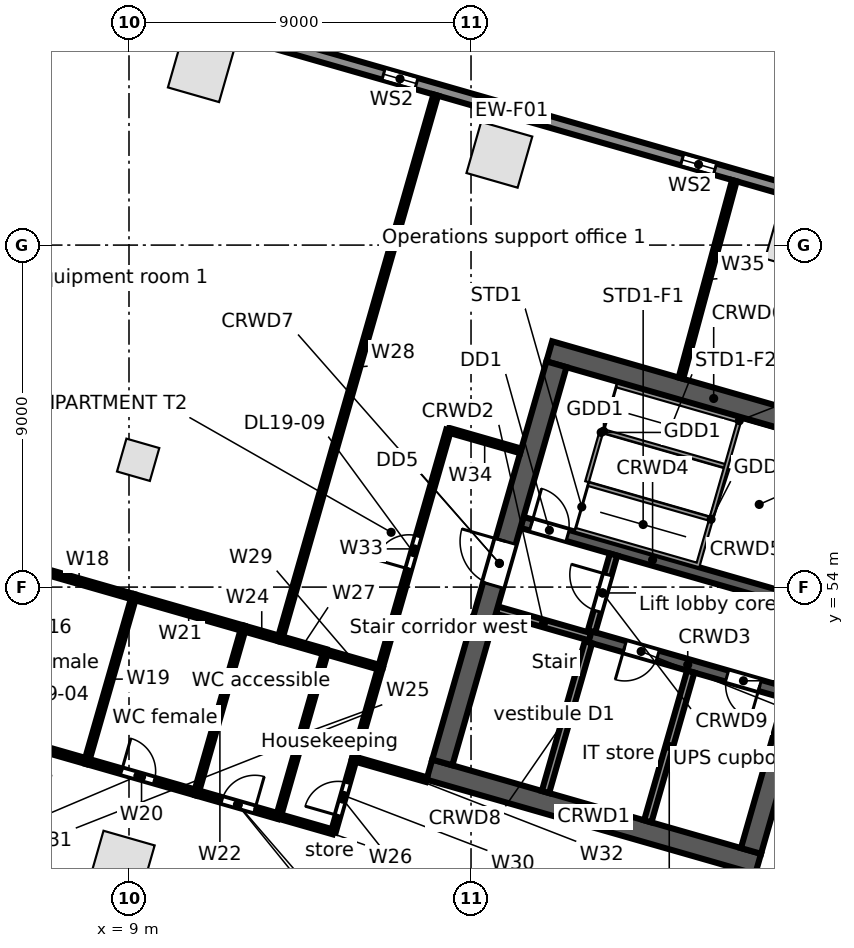
"""IFC4 building model, lengths in metres.
Left out: names, types, materials, properties, quantities, classifications, styles, units other than length and angle.
Written with IfcOpenShell. Run it as: python <this file> out.ifc"""

import sys

from ifc_helpers import new_model, si_unit, direction, frame, frame_2d, origin, origin_2d, place, context, subcontext, project, spatial, rectangle, extrude, element, fill, save


model = new_model("IFC4")
c1 = context("Model", 3, precision=1e-05, world=origin(), true_north=direction((0.0, 1.0)))
c2 = subcontext(c1, "Body", "Model", "MODEL_VIEW")
j1 = project(units=[si_unit("LENGTHUNIT", "METRE"), si_unit("PLANEANGLEUNIT", "RADIAN")], contexts=[c1])
p1 = place(None, origin())
s1 = spatial("IfcSite", under=j1, at=p1, CompositionType="ELEMENT")
p2 = place(p1, origin())
s2 = spatial("IfcBuilding", under=s1, at=p2, CompositionType="ELEMENT")
p3 = place(p2, frame((0.0, 0.0, 97.1)))
s3 = spatial("IfcBuildingStorey", under=s2, at=p3, CompositionType="ELEMENT", Elevation=97.1)
for number, where, z_axis, x_axis in (
    (1, (26.603, 63.124, 0.0), (0.0, 0.0, 1.0), (-0.961, 0.276, 0.0)),
    (2, (18.746, 65.376, 0.0), (0.0, 0.0, 1.0), (-0.961, 0.276, 0.0)),
    (3, (10.89, 67.629, 0.0), (0.0, 0.0, 1.0), (-0.961, 0.276, 0.0)),
    (4, (8.81, 46.722, 0.0), (0.0, 0.0, 1.0), (0.961, -0.276, 0.0)),
):
    element("IfcColumn", number, at=place(p3, frame(where, z_axis=z_axis, x_axis=x_axis)), inside=s3, PredefinedType="COLUMN", context=c2, shape_type="SweptSolid", body=[
        extrude(rectangle(XDim=1.4, YDim=1.4, at=origin_2d()), origin(), (0.0, 0.0, 1.0), 4.4),
    ])
p4 = place(p3, frame((9.241, 57.35, 0.0), z_axis=(0.0, 0.0, 1.0), x_axis=(0.961261695938, -0.275637355817, 0.0)))
e5 = element("IfcColumn", 5, at=p4, inside=s3, PredefinedType="COLUMN", context=c2, shape_type="SweptSolid", body=[
    extrude(rectangle(XDim=0.9, YDim=0.9, at=origin_2d()), origin(), (0.0, 0.0, 1.0), 4.4),
])
p5 = place(p3, frame((3.335, 71.044, 0.0), z_axis=(0.0, 0.0, 1.0), x_axis=(0.961260130989, -0.275642813387, 0.0)))
e6 = element("IfcWall", 6, at=p5, inside=s3, PredefinedType="STANDARD", context=c2, shape_type="SweptSolid", body=[
    extrude(rectangle(XDim=32.741, YDim=0.3, at=frame_2d((16.371, 0.0))), origin(), (0.0, 0.0, 1.0), 4.08),
])
p6 = place(p5, frame((29.207, 0.0, 0.6)))
e7 = element("IfcOpeningElement", 7, at=p6, cuts=e6, PredefinedType="OPENING", context=c2, shape_type="SweptSolid", body=[
    extrude(rectangle(XDim=0.9, YDim=2.8, at=frame_2d((0.45, 1.4))), frame((0.0, 0.16, 0.0), z_axis=(0.0, -1.0, 0.0), x_axis=(1.0, 0.0, 0.0)), (0.0, 0.0, 1.0), 0.32),
])
p7 = place(p5, frame((21.034, 0.0, 0.6)))
e8 = element("IfcOpeningElement", 8, at=p7, cuts=e6, PredefinedType="OPENING", context=c2, shape_type="SweptSolid", body=[
    extrude(rectangle(XDim=0.9, YDim=2.8, at=frame_2d((0.45, 1.4))), frame((0.0, 0.16, 0.0), z_axis=(0.0, -1.0, 0.0), x_axis=(1.0, 0.0, 0.0)), (0.0, 0.0, 1.0), 0.32),
])
p8 = place(p5, frame((12.861, 0.0, 0.6)))
e9 = element("IfcOpeningElement", 9, at=p8, cuts=e6, PredefinedType="OPENING", context=c2, shape_type="SweptSolid", body=[
    extrude(rectangle(XDim=0.9, YDim=2.8, at=frame_2d((0.45, 1.4))), frame((0.0, 0.16, 0.0), z_axis=(0.0, -1.0, 0.0), x_axis=(1.0, 0.0, 0.0)), (0.0, 0.0, 1.0), 0.32),
])
p9 = place(p5, frame((4.688, 0.0, 0.6)))
e10 = element("IfcOpeningElement", 10, at=p9, cuts=e6, PredefinedType="OPENING", context=c2, shape_type="SweptSolid", body=[
    extrude(rectangle(XDim=0.9, YDim=2.8, at=frame_2d((0.45, 1.4))), frame((0.0, 0.16, 0.0), z_axis=(0.0, -1.0, 0.0), x_axis=(1.0, 0.0, 0.0)), (0.0, 0.0, 1.0), 0.32),
])
p10 = place(p3, frame((25.398, 40.717, 0.0), z_axis=(0.0, 0.0, 1.0), x_axis=(-0.961262423262, 0.275634819324, 0.0)))
e11 = element("IfcWall", 11, at=p10, inside=s3, PredefinedType="STANDARD", context=c2, shape_type="SweptSolid", body=[
    extrude(rectangle(XDim=26.359, YDim=0.3, at=frame_2d((13.179, 0.0))), origin(), (0.0, 0.0, 1.0), 4.08),
])
p11 = place(p10, frame((22.664, 0.0, 0.6)))
e12 = element("IfcOpeningElement", 12, at=p11, cuts=e11, PredefinedType="OPENING", context=c2, shape_type="SweptSolid", body=[
    extrude(rectangle(XDim=0.9, YDim=2.8, at=frame_2d((0.45, 1.4))), frame((0.0, 0.16, 0.0), z_axis=(0.0, -1.0, 0.0), x_axis=(1.0, 0.0, 0.0)), (0.0, 0.0, 1.0), 0.32),
])
p12 = place(p10, frame((13.844, 0.0, 0.6)))
e13 = element("IfcOpeningElement", 13, at=p12, cuts=e11, PredefinedType="OPENING", context=c2, shape_type="SweptSolid", body=[
    extrude(rectangle(XDim=0.9, YDim=2.8, at=frame_2d((0.45, 1.4))), frame((0.0, 0.16, 0.0), z_axis=(0.0, -1.0, 0.0), x_axis=(1.0, 0.0, 0.0)), (0.0, 0.0, 1.0), 0.32),
])
p13 = place(p10, frame((5.023, 0.0, 0.6)))
e14 = element("IfcOpeningElement", 14, at=p13, cuts=e11, PredefinedType="OPENING", context=c2, shape_type="SweptSolid", body=[
    extrude(rectangle(XDim=0.9, YDim=2.8, at=frame_2d((0.45, 1.4))), frame((0.0, 0.16, 0.0), z_axis=(0.0, -1.0, 0.0), x_axis=(1.0, 0.0, 0.0)), (0.0, 0.0, 1.0), 0.32),
])
p14 = place(p3, frame((16.904, 49.197, 0.0), z_axis=(0.0, 0.0, 1.0), x_axis=(0.96126248289, -0.275634611374, 0.0)))
e15 = element("IfcWall", 15, at=p14, inside=s3, PredefinedType="SOLIDWALL", context=c2, shape_type="SweptSolid", body=[
    extrude(rectangle(XDim=9.0, YDim=0.55, at=frame_2d((4.5, 0.0))), origin(), (0.0, 0.0, 1.0), 4.08),
])
p15 = place(p3, frame((18.68, 53.396, 0.0), z_axis=(0.0, 0.0, 1.0), x_axis=(0.961234387647, -0.275732573349, 0.0)))
e16 = element("IfcWall", 16, at=p15, inside=s3, PredefinedType="SOLIDWALL", context=c2, shape_type="SweptSolid", body=[
    extrude(rectangle(XDim=2.55, YDim=0.2, at=frame_2d((1.275, 0.0))), origin(), (0.0, 0.0, 1.0), 4.08),
])
p16 = place(p3, frame((21.131, 52.692, 0.0), z_axis=(0.0, 0.0, 1.0), x_axis=(0.961265220997, -0.27562506218, 0.0)))
e17 = element("IfcWall", 17, at=p16, inside=s3, PredefinedType="SOLIDWALL", context=c2, shape_type="SweptSolid", body=[
    extrude(rectangle(XDim=5.35, YDim=0.3, at=frame_2d((2.675, 0.0))), origin(), (0.0, 0.0, 1.0), 4.08),
])
p17 = place(p16, frame((0.95, 0.0, 0.0)))
e18 = element("IfcOpeningElement", 18, at=p17, cuts=e17, PredefinedType="OPENING", context=c2, shape_type="SweptSolid", body=[
    extrude(rectangle(XDim=0.9, YDim=2.1, at=frame_2d((0.45, 1.05))), frame((0.0, 0.16, 0.0), z_axis=(0.0, -1.0, 0.0), x_axis=(1.0, 0.0, 0.0)), (0.0, 0.0, 1.0), 0.32),
])
p18 = place(p16, frame((3.75, 0.0, 0.0)))
e19 = element("IfcOpeningElement", 19, at=p18, cuts=e17, PredefinedType="OPENING", context=c2, shape_type="SweptSolid", body=[
    extrude(rectangle(XDim=0.9, YDim=2.1, at=frame_2d((0.45, 1.05))), frame((0.0, 0.16, 0.0), z_axis=(0.0, -1.0, 0.0), x_axis=(1.0, 0.0, 0.0)), (0.0, 0.0, 1.0), 0.32),
])
p19 = place(p3, frame((19.341, 55.702, 0.0), z_axis=(0.0, 0.0, 1.0), x_axis=(0.961263228157, -0.27563201228, 0.0)))
e20 = element("IfcWall", 20, at=p19, inside=s3, PredefinedType="SOLIDWALL", context=c2, shape_type="SweptSolid", body=[
    extrude(rectangle(XDim=7.15, YDim=0.3, at=frame_2d((3.575, 0.0))), origin(), (0.0, 0.0, 1.0), 4.08),
])
p20 = place(p19, frame((0.25, 0.0, 0.0)))
e21 = element("IfcOpeningElement", 21, at=p20, cuts=e20, PredefinedType="OPENING", context=c2, shape_type="SweptSolid", body=[
    extrude(rectangle(XDim=1.0, YDim=2.1, at=frame_2d((0.5, 1.05))), frame((0.0, 0.16, 0.0), z_axis=(0.0, -1.0, 0.0), x_axis=(1.0, 0.0, 0.0)), (0.0, 0.0, 1.0), 0.32),
])
p21 = place(p3, frame((20.06, 60.204, 0.0), z_axis=(0.0, 0.0, 1.0), x_axis=(0.96126248289, -0.275634611374, 0.0)))
e22 = element("IfcWall", 22, at=p21, inside=s3, PredefinedType="SOLIDWALL", context=c2, shape_type="SweptSolid", body=[
    extrude(rectangle(XDim=9.0, YDim=0.55, at=frame_2d((4.5, 0.0))), origin(), (0.0, 0.0, 1.0), 4.08),
])
p22 = place(p3, frame((17.244, 49.386, 0.0), z_axis=(0.0, 0.0, 1.0), x_axis=(0.275632146085, 0.96126318979, 0.0)))
e23 = element("IfcWall", 23, at=p22, inside=s3, PredefinedType="SOLIDWALL", context=c2, shape_type="SweptSolid", body=[
    extrude(rectangle(XDim=10.9, YDim=0.55, at=frame_2d((5.45, 0.0))), origin(), (0.0, 0.0, 1.0), 4.08),
])
p23 = place(p22, frame((4.85, 0.0, 0.0)))
e24 = element("IfcOpeningElement", 24, at=p23, cuts=e23, PredefinedType="OPENING", context=c2, shape_type="SweptSolid", body=[
    extrude(rectangle(XDim=1.2, YDim=2.1, at=frame_2d((0.6, 1.05))), frame((0.0, 0.285, 0.0), z_axis=(0.0, -1.0, 0.0), x_axis=(1.0, 0.0, 0.0)), (0.0, 0.0, 1.0), 0.57),
])
p24 = place(p3, frame((19.959, 48.607, 0.0), z_axis=(0.0, 0.0, 1.0), x_axis=(0.275641165445, 0.961260603537, 0.0)))
e25 = element("IfcWall", 25, at=p24, inside=s3, PredefinedType="SOLIDWALL", context=c2, shape_type="SweptSolid", body=[
    extrude(rectangle(XDim=4.1, YDim=0.2, at=frame_2d((2.05, 0.0))), origin(), (0.0, 0.0, 1.0), 4.08),
])
p25 = place(p3, frame((21.172, 52.837, 0.0), z_axis=(0.0, 0.0, 1.0), x_axis=(0.275657676022, 0.961255868981, 0.0)))
e26 = element("IfcWall", 26, at=p25, inside=s3, PredefinedType="PARTITIONING", context=c2, shape_type="SweptSolid", body=[
    extrude(rectangle(XDim=2.1, YDim=0.2, at=frame_2d((1.05, 0.0))), origin(), (0.0, 0.0, 1.0), 4.08),
])
p26 = place(p25, frame((0.55, 0.0, 0.0)))
e27 = element("IfcOpeningElement", 27, at=p26, cuts=e26, PredefinedType="OPENING", context=c2, shape_type="SweptSolid", body=[
    extrude(rectangle(XDim=1.0, YDim=2.1, at=frame_2d((0.5, 1.05))), frame((0.0, 0.11, 0.0), z_axis=(0.0, -1.0, 0.0), x_axis=(1.0, 0.0, 0.0)), (0.0, 0.0, 1.0), 0.22),
])
p27 = place(p3, frame((22.651, 47.835, 0.0), z_axis=(0.0, 0.0, 1.0), x_axis=(0.275625388668, 0.961265127383, 0.0)))
e28 = element("IfcWall", 28, at=p27, inside=s3, PredefinedType="PARTITIONING", context=c2, shape_type="SweptSolid", body=[
    extrude(rectangle(XDim=4.1, YDim=0.2, at=frame_2d((2.05, 0.0))), origin(), (0.0, 0.0, 1.0), 4.08),
])
p28 = place(p3, frame((25.366, 47.057, 0.0), z_axis=(0.0, 0.0, 1.0), x_axis=(0.275632146085, 0.96126318979, 0.0)))
e29 = element("IfcWall", 29, at=p28, inside=s3, PredefinedType="SOLIDWALL", context=c2, shape_type="SweptSolid", body=[
    extrude(rectangle(XDim=10.9, YDim=0.55, at=frame_2d((5.45, 0.0))), origin(), (0.0, 0.0, 1.0), 4.08),
])
p29 = place(p28, frame((4.85, 0.0, 0.0)))
e30 = element("IfcOpeningElement", 30, at=p29, cuts=e29, PredefinedType="OPENING", context=c2, shape_type="SweptSolid", body=[
    extrude(rectangle(XDim=1.2, YDim=2.1, at=frame_2d((0.6, 1.05))), frame((0.0, 0.285, 0.0), z_axis=(0.0, -1.0, 0.0), x_axis=(1.0, 0.0, 0.0)), (0.0, 0.0, 1.0), 0.57),
])
p30 = place(p3, frame((5.004, 50.243, 0.0), z_axis=(0.0, 0.0, 1.0), x_axis=(0.961268664977, -0.27561305073, 0.0)))
e31 = element("IfcWall", 31, at=p30, inside=s3, PredefinedType="PARTITIONING", context=c2, shape_type="SweptSolid", body=[
    extrude(rectangle(XDim=3.0, YDim=0.15, at=frame_2d((1.5, 0.0))), origin(), (0.0, 0.0, 1.0), 4.08),
])
p31 = place(p30, frame((0.95, 0.0, 0.0)))
e32 = element("IfcOpeningElement", 32, at=p31, cuts=e31, PredefinedType="OPENING", context=c2, shape_type="SweptSolid", body=[
    extrude(rectangle(XDim=0.9, YDim=2.1, at=frame_2d((0.45, 1.05))), frame((0.0, 0.085, 0.0), z_axis=(0.0, -1.0, 0.0), x_axis=(1.0, 0.0, 0.0)), (0.0, 0.0, 1.0), 0.17),
])
p32 = place(p3, frame((6.245, 54.568, 0.0), z_axis=(0.0, 0.0, 1.0), x_axis=(0.961240918172, -0.275709806194, 0.0)))
e33 = element("IfcWall", 33, at=p32, inside=s3, PredefinedType="PARTITIONING", context=c2, shape_type="SweptSolid", body=[
    extrude(rectangle(XDim=3.0, YDim=0.15, at=frame_2d((1.5, 0.0))), origin(), (0.0, 0.0, 1.0), 3.16),
])
p33 = place(p3, frame((7.888, 49.416, 0.0), z_axis=(0.0, 0.0, 1.0), x_axis=(0.275803080638, 0.96121415965, 0.0)))
e34 = element("IfcWall", 34, at=p33, inside=s3, PredefinedType="PARTITIONING", context=c2, shape_type="SweptSolid", body=[
    extrude(rectangle(XDim=4.5, YDim=0.125, at=frame_2d((2.25, 0.0))), origin(), (0.0, 0.0, 1.0), 3.16),
])
p34 = place(p3, frame((7.888, 49.416, 0.0), z_axis=(0.0, 0.0, 1.0), x_axis=(0.961268664977, -0.27561305073, 0.0)))
e35 = element("IfcWall", 35, at=p34, inside=s3, PredefinedType="PARTITIONING", context=c2, shape_type="SweptSolid", body=[
    extrude(rectangle(XDim=3.0, YDim=0.15, at=frame_2d((1.5, 0.0))), origin(), (0.0, 0.0, 1.0), 3.142),
])
p35 = place(p34, frame((0.95, 0.0, 0.0)))
e36 = element("IfcOpeningElement", 36, at=p35, cuts=e35, PredefinedType="OPENING", context=c2, shape_type="SweptSolid", body=[
    extrude(rectangle(XDim=0.9, YDim=2.1, at=frame_2d((0.45, 1.05))), frame((0.0, 0.085, 0.0), z_axis=(0.0, -1.0, 0.0), x_axis=(1.0, 0.0, 0.0)), (0.0, 0.0, 1.0), 0.17),
])
p36 = place(p3, frame((9.129, 53.741, 0.0), z_axis=(0.0, 0.0, 1.0), x_axis=(0.961243927922, -0.275699312717, 0.0)))
e37 = element("IfcWall", 37, at=p36, inside=s3, PredefinedType="PARTITIONING", context=c2, shape_type="SweptSolid", body=[
    extrude(rectangle(XDim=2.999, YDim=0.15, at=frame_2d((1.5, 0.0))), origin(), (0.0, 0.0, 1.0), 3.142),
])
p37 = place(p3, frame((10.772, 48.589, 0.0), z_axis=(0.0, 0.0, 1.0), x_axis=(0.275602532653, 0.961271680637, 0.0)))
e38 = element("IfcWall", 38, at=p37, inside=s3, PredefinedType="PARTITIONING", context=c2, shape_type="SweptSolid", body=[
    extrude(rectangle(XDim=4.499, YDim=0.125, at=frame_2d((2.25, 0.0))), origin(), (0.0, 0.0, 1.0), 4.08),
])
p38 = place(p3, frame((10.772, 48.589, 0.0), z_axis=(0.0, 0.0, 1.0), x_axis=(0.96127791106, -0.275580800688, 0.0)))
e39 = element("IfcWall", 39, at=p38, inside=s3, PredefinedType="PARTITIONING", context=c2, shape_type="SweptSolid", body=[
    extrude(rectangle(XDim=2.25, YDim=0.15, at=frame_2d((1.125, 0.0))), origin(), (0.0, 0.0, 1.0), 4.08),
])
p39 = place(p38, frame((0.7, 0.0, 0.0)))
e40 = element("IfcOpeningElement", 40, at=p39, cuts=e39, PredefinedType="OPENING", context=c2, shape_type="SweptSolid", body=[
    extrude(rectangle(XDim=0.9, YDim=2.1, at=frame_2d((0.45, 1.05))), frame((0.0, 0.085, 0.0), z_axis=(0.0, -1.0, 0.0), x_axis=(1.0, 0.0, 0.0)), (0.0, 0.0, 1.0), 0.17),
])
p40 = place(p3, frame((12.012, 52.914, 0.0), z_axis=(0.0, 0.0, 1.0), x_axis=(0.961459478043, -0.274946671341, 0.0)))
e41 = element("IfcWall", 41, at=p40, inside=s3, PredefinedType="PARTITIONING", context=c2, shape_type="SweptSolid", body=[
    extrude(rectangle(XDim=1.001, YDim=0.15, at=frame_2d((0.5, 0.0))), origin(), (0.0, 0.0, 1.0), 4.08),
])
p41 = place(p3, frame((12.935, 47.969, 0.0), z_axis=(0.0, 0.0, 1.0), x_axis=(0.275602532653, 0.961271680637, 0.0)))
e42 = element("IfcWall", 42, at=p41, inside=s3, PredefinedType="PARTITIONING", context=c2, shape_type="SweptSolid", body=[
    extrude(rectangle(XDim=4.499, YDim=0.125, at=frame_2d((2.25, 0.0))), origin(), (0.0, 0.0, 1.0), 4.08),
])
p42 = place(p3, frame((12.935, 47.969, 0.0), z_axis=(0.0, 0.0, 1.0), x_axis=(0.961154610169, -0.276010534854, 0.0)))
e43 = element("IfcWall", 43, at=p42, inside=s3, PredefinedType="PARTITIONING", context=c2, shape_type="SweptSolid", body=[
    extrude(rectangle(XDim=1.5, YDim=0.125, at=frame_2d((0.75, 0.0))), origin(), (0.0, 0.0, 1.0), 4.08),
])
p43 = place(p3, frame((12.974, 52.639, 0.0), z_axis=(0.0, 0.0, 1.0), x_axis=(0.961132191281, -0.276088592454, 0.0)))
e44 = element("IfcWall", 44, at=p43, inside=s3, PredefinedType="PARTITIONING", context=c2, shape_type="SweptSolid", body=[
    extrude(rectangle(XDim=1.25, YDim=0.15, at=frame_2d((0.625, 0.0))), origin(), (0.0, 0.0, 1.0), 4.08),
])
p44 = place(p3, frame((12.974, 52.639, 0.0), z_axis=(0.0, 0.0, 1.0), x_axis=(0.275299463768, 0.961358520662, 0.0)))
e45 = element("IfcWall", 45, at=p44, inside=s3, PredefinedType="PARTITIONING", context=c2, shape_type="SweptSolid", body=[
    extrude(rectangle(XDim=14.885, YDim=0.125, at=frame_2d((7.443, 0.0))), origin(), (0.0, 0.0, 1.0), 3.142),
])
p45 = place(p3, frame((14.175, 52.294, 0.0), z_axis=(0.0, 0.0, 1.0), x_axis=(0.961370232732, -0.275258561387, 0.0)))
e46 = element("IfcWall", 46, at=p45, inside=s3, PredefinedType="PARTITIONING", context=c2, shape_type="SweptSolid", body=[
    extrude(rectangle(XDim=1.5, YDim=0.125, at=frame_2d((0.75, 0.0))), origin(), (0.0, 0.0, 1.0), 4.08),
])
p46 = place(p3, frame((14.377, 47.555, 0.0), z_axis=(0.0, 0.0, 1.0), x_axis=(0.275446387355, 0.961316434736, 0.0)))
e47 = element("IfcWall", 47, at=p46, inside=s3, PredefinedType="PARTITIONING", context=c2, shape_type="SweptSolid", body=[
    extrude(rectangle(XDim=2.0, YDim=0.125, at=frame_2d((1.0, 0.0))), origin(), (0.0, 0.0, 1.0), 4.08),
])
p47 = place(p46, frame((0.45, 0.0, 0.0)))
e48 = element("IfcOpeningElement", 48, at=p47, cuts=e47, PredefinedType="OPENING", context=c2, shape_type="SweptSolid", body=[
    extrude(rectangle(XDim=0.9, YDim=2.1, at=frame_2d((0.45, 1.05))), frame((0.0, 0.073, 0.0), z_axis=(0.0, -1.0, 0.0), x_axis=(1.0, 0.0, 0.0)), (0.0, 0.0, 1.0), 0.145),
])
p48 = place(p3, frame((14.928, 49.478, 0.0), z_axis=(0.0, 0.0, 1.0), x_axis=(0.275598116036, 0.961272946898, 0.0)))
e49 = element("IfcWall", 49, at=p48, inside=s3, PredefinedType="PARTITIONING", context=c2, shape_type="SweptSolid", body=[
    extrude(rectangle(XDim=2.5, YDim=0.125, at=frame_2d((1.25, 0.0))), origin(), (0.0, 0.0, 1.0), 4.08),
])
p49 = place(p3, frame((14.928, 49.478, 0.0), z_axis=(0.0, 0.0, 1.0), x_axis=(0.961243778232, -0.27569983462, 0.0)))
e50 = element("IfcWall", 50, at=p49, inside=s3, PredefinedType="PARTITIONING", context=c2, shape_type="SweptSolid", body=[
    extrude(rectangle(XDim=1.977, YDim=0.125, at=frame_2d((0.988, 0.0))), origin(), (0.0, 0.0, 1.0), 4.08),
])
p50 = place(p3, frame((15.617, 51.881, 0.0), z_axis=(0.0, 0.0, 1.0), x_axis=(0.275703259795, 0.961242795832, 0.0)))
e51 = element("IfcWall", 51, at=p50, inside=s3, PredefinedType="PARTITIONING", context=c2, shape_type="SweptSolid", body=[
    extrude(rectangle(XDim=6.5, YDim=0.125, at=frame_2d((3.25, 0.0))), origin(), (0.0, 0.0, 1.0), 3.142),
])
p51 = place(p50, frame((2.7, 0.0, 0.0)))
e52 = element("IfcOpeningElement", 52, at=p51, cuts=e51, PredefinedType="OPENING", context=c2, shape_type="SweptSolid", body=[
    extrude(rectangle(XDim=0.9, YDim=2.1, at=frame_2d((0.45, 1.05))), frame((0.0, 0.073, 0.0), z_axis=(0.0, -1.0, 0.0), x_axis=(1.0, 0.0, 0.0)), (0.0, 0.0, 1.0), 0.145),
])
p52 = place(p3, frame((17.409, 58.129, 0.0), z_axis=(0.0, 0.0, 1.0), x_axis=(0.961253165474, -0.275667103345, 0.0)))
e53 = element("IfcWall", 53, at=p52, inside=s3, PredefinedType="PARTITIONING", context=c2, shape_type="SweptSolid", body=[
    extrude(rectangle(XDim=1.977, YDim=0.125, at=frame_2d((0.988, 0.0))), origin(), (0.0, 0.0, 1.0), 4.08),
])
p53 = place(p3, frame((23.523, 59.497, 0.0), z_axis=(0.0, 0.0, 1.0), x_axis=(0.261275557939, 0.965264255437, 0.0)))
e54 = element("IfcWall", 54, at=p53, inside=s3, PredefinedType="PARTITIONING", context=c2, shape_type="SweptSolid", body=[
    extrude(rectangle(XDim=5.385, YDim=0.125, at=frame_2d((2.692, 0.0))), origin(), (0.0, 0.0, 1.0), 3.36),
])
p54 = place(p7, origin())
e55 = element("IfcWindow", 55, at=p54, inside=s3, PartitioningType="SINGLE_PANEL", PredefinedType="WINDOW", context=c2, shape_type="SweptSolid", body=[
    extrude(rectangle(XDim=0.9, YDim=2.8, at=frame_2d((0.45, 1.4))), frame((0.0, 0.03, 0.0), z_axis=(0.0, -1.0, 0.0), x_axis=(1.0, 0.0, 0.0)), (0.0, 0.0, 1.0), 0.06),
])
fill(e8, e55)
p55 = place(p8, origin())
e56 = element("IfcWindow", 56, at=p55, inside=s3, PartitioningType="SINGLE_PANEL", PredefinedType="WINDOW", context=c2, shape_type="SweptSolid", body=[
    extrude(rectangle(XDim=0.9, YDim=2.8, at=frame_2d((0.45, 1.4))), frame((0.0, 0.03, 0.0), z_axis=(0.0, -1.0, 0.0), x_axis=(1.0, 0.0, 0.0)), (0.0, 0.0, 1.0), 0.06),
])
fill(e9, e56)
p56 = place(p20, origin())
e57 = element("IfcDoor", 57, at=p56, inside=s3, OperationType="SINGLE_SWING_LEFT", PredefinedType="DOOR", context=c2, shape_type="SweptSolid", body=[
    extrude(rectangle(XDim=1.0, YDim=2.1, at=frame_2d((0.5, 1.05))), frame((0.0, 0.025, 0.0), z_axis=(0.0, -1.0, 0.0), x_axis=(1.0, 0.0, 0.0)), (0.0, 0.0, 1.0), 0.05),
])
fill(e21, e57)
p57 = place(p26, origin())
e58 = element("IfcDoor", 58, at=p57, inside=s3, OperationType="SINGLE_SWING_RIGHT", PredefinedType="DOOR", context=c2, shape_type="SweptSolid", body=[
    extrude(rectangle(XDim=1.0, YDim=2.1, at=frame_2d((0.5, 1.05))), frame((0.0, 0.025, 0.0), z_axis=(0.0, -1.0, 0.0), x_axis=(1.0, 0.0, 0.0)), (0.0, 0.0, 1.0), 0.05),
])
fill(e27, e58)
p58 = place(p23, origin())
e59 = element("IfcDoor", 59, at=p58, inside=s3, OperationType="SINGLE_SWING_RIGHT", PredefinedType="DOOR", context=c2, shape_type="SweptSolid", body=[
    extrude(rectangle(XDim=1.2, YDim=2.1, at=frame_2d((0.6, 1.05))), frame((0.0, 0.025, 0.0), z_axis=(0.0, -1.0, 0.0), x_axis=(1.0, 0.0, 0.0)), (0.0, 0.0, 1.0), 0.05),
])
fill(e24, e59)
p59 = place(p17, frame((0.9, 0.0, 0.0), z_axis=(0.0, 0.0, 1.0), x_axis=(-1.0, 0.0, 0.0)))
e60 = element("IfcDoor", 60, at=p59, inside=s3, OperationType="SINGLE_SWING_RIGHT", PredefinedType="DOOR", context=c2, shape_type="SweptSolid", body=[
    extrude(rectangle(XDim=0.9, YDim=2.1, at=frame_2d((0.45, 1.05))), frame((0.0, 0.025, 0.0), z_axis=(0.0, -1.0, 0.0), x_axis=(1.0, 0.0, 0.0)), (0.0, 0.0, 1.0), 0.05),
])
fill(e18, e60)
p60 = place(p18, frame((0.9, 0.0, 0.0), z_axis=(0.0, 0.0, 1.0), x_axis=(-1.0, 0.0, 0.0)))
e61 = element("IfcDoor", 61, at=p60, inside=s3, OperationType="SINGLE_SWING_LEFT", PredefinedType="DOOR", context=c2, shape_type="SweptSolid", body=[
    extrude(rectangle(XDim=0.9, YDim=2.1, at=frame_2d((0.45, 1.05))), frame((0.0, 0.025, 0.0), z_axis=(0.0, -1.0, 0.0), x_axis=(1.0, 0.0, 0.0)), (0.0, 0.0, 1.0), 0.05),
])
fill(e19, e61)
p61 = place(p35, origin())
e62 = element("IfcDoor", 62, at=p61, inside=s3, OperationType="SINGLE_SWING_LEFT", PredefinedType="DOOR", context=c2, shape_type="SweptSolid", body=[
    extrude(rectangle(XDim=0.9, YDim=2.1, at=frame_2d((0.45, 1.05))), frame((0.0, 0.025, 0.0), z_axis=(0.0, -1.0, 0.0), x_axis=(1.0, 0.0, 0.0)), (0.0, 0.0, 1.0), 0.05),
])
fill(e36, e62)
p62 = place(p39, origin())
e63 = element("IfcDoor", 63, at=p62, inside=s3, OperationType="SINGLE_SWING_RIGHT", PredefinedType="DOOR", context=c2, shape_type="SweptSolid", body=[
    extrude(rectangle(XDim=0.9, YDim=2.1, at=frame_2d((0.45, 1.05))), frame((0.0, 0.025, 0.0), z_axis=(0.0, -1.0, 0.0), x_axis=(1.0, 0.0, 0.0)), (0.0, 0.0, 1.0), 0.05),
])
fill(e40, e63)
p63 = place(p47, origin())
e64 = element("IfcDoor", 64, at=p63, inside=s3, OperationType="SINGLE_SWING_LEFT", PredefinedType="DOOR", context=c2, shape_type="SweptSolid", body=[
    extrude(rectangle(XDim=0.9, YDim=2.1, at=frame_2d((0.45, 1.05))), frame((0.0, 0.025, 0.0), z_axis=(0.0, -1.0, 0.0), x_axis=(1.0, 0.0, 0.0)), (0.0, 0.0, 1.0), 0.05),
])
fill(e48, e64)
p64 = place(p51, origin())
e65 = element("IfcDoor", 65, at=p64, inside=s3, OperationType="SINGLE_SWING_LEFT", PredefinedType="DOOR", context=c2, shape_type="SweptSolid", body=[
    extrude(rectangle(XDim=0.9, YDim=2.1, at=frame_2d((0.45, 1.05))), frame((0.0, 0.025, 0.0), z_axis=(0.0, -1.0, 0.0), x_axis=(1.0, 0.0, 0.0)), (0.0, 0.0, 1.0), 0.05),
])
fill(e52, e65)
save(model, sys.argv[1])
